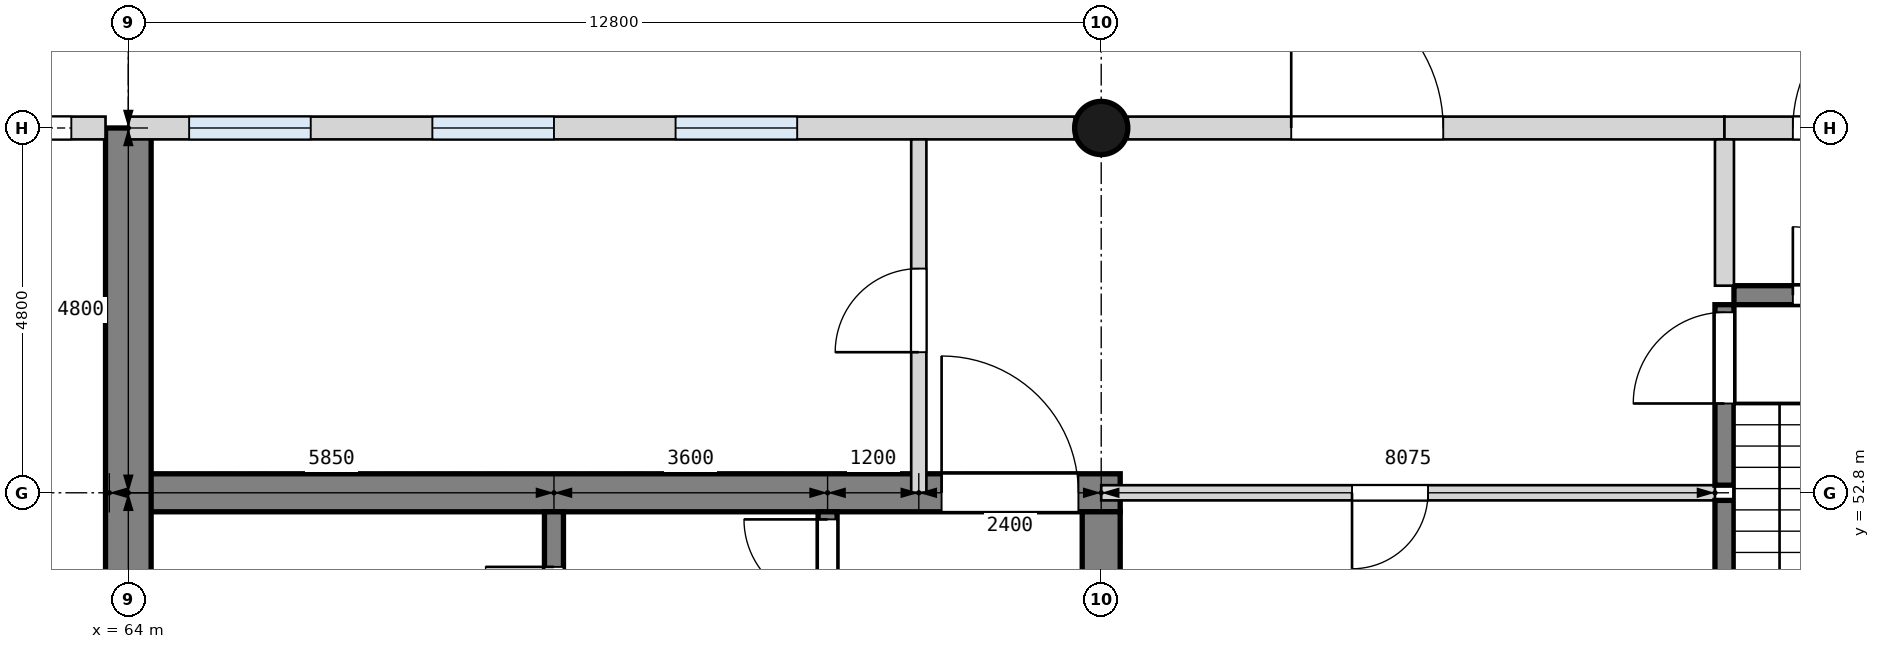
"""IFC4 building model, lengths in metres.
Left out: names, types, materials, properties, quantities, classifications, styles, units other than length and angle.
Written with IfcOpenShell. Run it as: python <this file> out.ifc"""

import sys

from ifc_helpers import new_model, si_unit, direction, frame, frame_2d, origin, origin_2d, place, context, subcontext, project, spatial, rectangle, circle, extrude, element, fill, save


model = new_model("IFC4")
c1 = context("Model", 3, precision=1e-05, world=origin(), true_north=direction((0.0, 1.0)))
c2 = subcontext(c1, "Body", "Model", "MODEL_VIEW")
j1 = project(units=[si_unit("LENGTHUNIT", "METRE"), si_unit("PLANEANGLEUNIT", "RADIAN")], contexts=[c1])
p1 = place(None, origin())
s1 = spatial("IfcSite", under=j1, at=p1, CompositionType="ELEMENT")
p2 = place(p1, origin())
s2 = spatial("IfcBuilding", under=s1, at=p2, CompositionType="ELEMENT")
p3 = place(p2, origin())
s3 = spatial("IfcBuildingStorey", under=s2, at=p3, CompositionType="ELEMENT", Elevation=0.0)
p4 = place(p3, frame((63.75, 52.8, 0.0), z_axis=(0.0, 0.0, 1.0), x_axis=(1.0, 0.0, 0.0)))
e1 = element("IfcWall", 1, at=p4, inside=s3, PredefinedType="SHEAR", context=c2, shape_type="SweptSolid", body=[
    extrude(rectangle(XDim=13.3, YDim=0.5, at=frame_2d((6.65, 0.0))), origin(), (0.0, 0.0, 1.0), 4.2),
])
p5 = place(p4, frame((10.95, 0.0, 0.0)))
e2 = element("IfcOpeningElement", 2, at=p5, cuts=e1, PredefinedType="OPENING", context=c2, shape_type="SweptSolid", body=[
    extrude(rectangle(XDim=1.8, YDim=2.1, at=frame_2d((0.9, 1.05))), frame((0.0, 0.26, 0.0), z_axis=(0.0, -1.0, 0.0), x_axis=(1.0, 0.0, 0.0)), (0.0, 0.0, 1.0), 0.52),
])
p6 = place(p3, frame((76.8, 33.85, 0.0), z_axis=(0.0, 0.0, 1.0), x_axis=(0.0, 1.0, 0.0)))
e3 = element("IfcWall", 3, at=p6, inside=s3, PredefinedType="SHEAR", context=c2, shape_type="SweptSolid", body=[
    extrude(rectangle(XDim=18.7, YDim=0.5, at=frame_2d((9.35, 0.0))), origin(), (0.0, 0.0, 1.0), 4.2),
])
p7 = place(p3, frame((64.0, 28.8, 0.0), z_axis=(0.0, 0.0, 1.0), x_axis=(0.0, 1.0, 0.0)))
e4 = element("IfcWall", 4, at=p7, inside=s3, PredefinedType="SHEAR", context=c2, shape_type="SweptSolid", body=[
    extrude(rectangle(XDim=28.8, YDim=0.6, at=frame_2d((14.4, 0.0))), origin(), (0.0, 0.0, 1.0), 4.2),
])
p8 = place(p7, frame((0.5, 0.0, 0.0)))
e5 = element("IfcOpeningElement", 5, at=p8, cuts=e4, PredefinedType="OPENING", context=c2, shape_type="SweptSolid", body=[
    extrude(rectangle(XDim=1.2, YDim=2.1, at=frame_2d((0.6, 1.05))), frame((0.0, 0.31, 0.0), z_axis=(0.0, -1.0, 0.0), x_axis=(1.0, 0.0, 0.0)), (0.0, 0.0, 1.0), 0.62),
])
p9 = place(p7, frame((3.1, 0.0, 0.0)))
e6 = element("IfcOpeningElement", 6, at=p9, cuts=e4, PredefinedType="OPENING", context=c2, shape_type="SweptSolid", body=[
    extrude(rectangle(XDim=1.2, YDim=2.1, at=frame_2d((0.6, 1.05))), frame((0.0, 0.31, 0.0), z_axis=(0.0, -1.0, 0.0), x_axis=(1.0, 0.0, 0.0)), (0.0, 0.0, 1.0), 0.62),
])
p10 = place(p3, frame((76.8, 57.6, 0.0), z_axis=(0.0, 0.0, 1.0), x_axis=(1.0, 0.0, 0.0)))
e7 = element("IfcColumn", 7, at=p10, inside=s3, PredefinedType="COLUMN", context=c2, shape_type="SweptSolid", body=[
    extrude(circle(Radius=0.35, at=origin_2d()), origin(), (0.0, 0.0, 1.0), 4.2),
])
p11 = place(p3, frame((64.0, 57.6, 0.0), z_axis=(0.0, 0.0, 1.0), x_axis=(1.0, 0.0, 0.0)))
e8 = element("IfcWall", 8, at=p11, inside=s3, PredefinedType="SOLIDWALL", context=c2, shape_type="SweptSolid", body=[
    extrude(rectangle(XDim=12.45, YDim=0.3, at=frame_2d((6.225, 0.0))), origin(), (0.0, 0.0, 1.0), 3.0),
])
p12 = place(p11, frame((0.8, 0.0, 0.3)))
e9 = element("IfcOpeningElement", 9, at=p12, cuts=e8, PredefinedType="OPENING", context=c2, shape_type="SweptSolid", body=[
    extrude(rectangle(XDim=1.6, YDim=2.4, at=frame_2d((0.8, 1.2))), frame((0.0, 0.16, 0.0), z_axis=(0.0, -1.0, 0.0), x_axis=(1.0, 0.0, 0.0)), (0.0, 0.0, 1.0), 0.32),
])
p13 = place(p11, frame((4.0, 0.0, 0.3)))
e10 = element("IfcOpeningElement", 10, at=p13, cuts=e8, PredefinedType="OPENING", context=c2, shape_type="SweptSolid", body=[
    extrude(rectangle(XDim=1.6, YDim=2.4, at=frame_2d((0.8, 1.2))), frame((0.0, 0.16, 0.0), z_axis=(0.0, -1.0, 0.0), x_axis=(1.0, 0.0, 0.0)), (0.0, 0.0, 1.0), 0.32),
])
p14 = place(p11, frame((7.2, 0.0, 0.3)))
e11 = element("IfcOpeningElement", 11, at=p14, cuts=e8, PredefinedType="OPENING", context=c2, shape_type="SweptSolid", body=[
    extrude(rectangle(XDim=1.6, YDim=2.4, at=frame_2d((0.8, 1.2))), frame((0.0, 0.16, 0.0), z_axis=(0.0, -1.0, 0.0), x_axis=(1.0, 0.0, 0.0)), (0.0, 0.0, 1.0), 0.32),
])
p15 = place(p3, frame((77.15, 57.6, 0.0), z_axis=(0.0, 0.0, 1.0), x_axis=(1.0, 0.0, 0.0)))
e12 = element("IfcWall", 12, at=p15, inside=s3, PredefinedType="SOLIDWALL", context=c2, shape_type="SweptSolid", body=[
    extrude(rectangle(XDim=7.85, YDim=0.3, at=frame_2d((3.925, 0.0))), origin(), (0.0, 0.0, 1.0), 3.0),
])
p16 = place(p15, frame((2.15, 0.0, 0.0)))
e13 = element("IfcOpeningElement", 13, at=p16, cuts=e12, PredefinedType="OPENING", context=c2, shape_type="SweptSolid", body=[
    extrude(rectangle(XDim=2.0, YDim=2.1, at=frame_2d((1.0, 1.05))), frame((0.0, 0.16, 0.0), z_axis=(0.0, -1.0, 0.0), x_axis=(1.0, 0.0, 0.0)), (0.0, 0.0, 1.0), 0.32),
])
p17 = place(p3, frame((85.0, 57.6, 0.0), z_axis=(0.0, 0.0, 1.0), x_axis=(1.0, 0.0, 0.0)))
e14 = element("IfcWall", 14, at=p17, inside=s3, PredefinedType="SOLIDWALL", context=c2, shape_type="SweptSolid", body=[
    extrude(rectangle(XDim=4.25, YDim=0.3, at=frame_2d((2.125, 0.0))), origin(), (0.0, 0.0, 1.0), 3.0),
])
p18 = place(p17, frame((0.9, 0.0, 0.0)))
e15 = element("IfcOpeningElement", 15, at=p18, cuts=e14, PredefinedType="OPENING", context=c2, shape_type="SweptSolid", body=[
    extrude(rectangle(XDim=1.8, YDim=2.1, at=frame_2d((0.9, 1.05))), frame((0.0, 0.16, 0.0), z_axis=(0.0, -1.0, 0.0), x_axis=(1.0, 0.0, 0.0)), (0.0, 0.0, 1.0), 0.32),
])
p19 = place(p3, frame((58.4, 57.6, 0.0), z_axis=(0.0, 0.0, 1.0), x_axis=(1.0, 0.0, 0.0)))
e16 = element("IfcWall", 16, at=p19, inside=s3, PredefinedType="SOLIDWALL", context=c2, shape_type="SweptSolid", body=[
    extrude(rectangle(XDim=5.3, YDim=0.3, at=frame_2d((2.65, 0.0))), origin(), (0.0, 0.0, 1.0), 5.1),
])
p20 = place(p19, frame((0.45, 0.0, 0.0)))
e17 = element("IfcOpeningElement", 17, at=p20, cuts=e16, PredefinedType="OPENING", context=c2, shape_type="SweptSolid", body=[
    extrude(rectangle(XDim=4.4, YDim=4.5, at=frame_2d((2.2, 2.25))), frame((0.0, 0.16, 0.0), z_axis=(0.0, -1.0, 0.0), x_axis=(1.0, 0.0, 0.0)), (0.0, 0.0, 1.0), 0.32),
])
p21 = place(p3, frame((73.2, 46.475, 0.0), z_axis=(0.0, 0.0, 1.0), x_axis=(0.0, 1.0, 0.0)))
e18 = element("IfcWall", 18, at=p21, inside=s3, PredefinedType="SOLIDWALL", context=c2, shape_type="SweptSolid", body=[
    extrude(rectangle(XDim=6.075, YDim=0.25, at=frame_2d((3.038, 0.0))), origin(), (0.0, 0.0, 1.0), 3.9),
])
p22 = place(p21, frame((4.875, 0.0, 0.0)))
e19 = element("IfcOpeningElement", 19, at=p22, cuts=e18, PredefinedType="OPENING", context=c2, shape_type="SweptSolid", body=[
    extrude(rectangle(XDim=1.1, YDim=2.1, at=frame_2d((0.55, 1.05))), frame((0.0, 0.135, 0.0), z_axis=(0.0, -1.0, 0.0), x_axis=(1.0, 0.0, 0.0)), (0.0, 0.0, 1.0), 0.27),
])
p23 = place(p3, frame((69.6, 46.475, 0.0), z_axis=(0.0, 0.0, 1.0), x_axis=(0.0, 1.0, 0.0)))
e20 = element("IfcWall", 20, at=p23, inside=s3, PredefinedType="SOLIDWALL", context=c2, shape_type="SweptSolid", body=[
    extrude(rectangle(XDim=6.075, YDim=0.25, at=frame_2d((3.038, 0.0))), origin(), (0.0, 0.0, 1.0), 3.9),
])
p24 = place(p23, frame((1.312, 0.0, 0.0)))
e21 = element("IfcOpeningElement", 21, at=p24, cuts=e20, PredefinedType="OPENING", context=c2, shape_type="SweptSolid", body=[
    extrude(rectangle(XDim=1.0, YDim=2.1, at=frame_2d((0.5, 1.05))), frame((0.0, 0.135, 0.0), z_axis=(0.0, -1.0, 0.0), x_axis=(1.0, 0.0, 0.0)), (0.0, 0.0, 1.0), 0.27),
])
p25 = place(p23, frame((4.45, 0.0, 0.0)))
e22 = element("IfcOpeningElement", 22, at=p25, cuts=e20, PredefinedType="OPENING", context=c2, shape_type="SweptSolid", body=[
    extrude(rectangle(XDim=0.9, YDim=2.1, at=frame_2d((0.45, 1.05))), frame((0.0, 0.135, 0.0), z_axis=(0.0, -1.0, 0.0), x_axis=(1.0, 0.0, 0.0)), (0.0, 0.0, 1.0), 0.27),
])
p26 = place(p3, frame((84.875, 52.8, 0.0), z_axis=(0.0, 0.0, 1.0), x_axis=(-1.0, 0.0, 0.0)))
e23 = element("IfcWall", 23, at=p26, inside=s3, PredefinedType="PARTITIONING", context=c2, shape_type="SweptSolid", body=[
    extrude(rectangle(XDim=8.075, YDim=0.2, at=frame_2d((4.038, 0.0))), origin(), (0.0, 0.0, 1.0), 3.9),
])
p27 = place(p26, frame((3.775, 0.0, 0.0)))
e24 = element("IfcOpeningElement", 24, at=p27, cuts=e23, PredefinedType="OPENING", context=c2, shape_type="SweptSolid", body=[
    extrude(rectangle(XDim=1.0, YDim=2.1, at=frame_2d((0.5, 1.05))), frame((0.0, 0.11, 0.0), z_axis=(0.0, -1.0, 0.0), x_axis=(1.0, 0.0, 0.0)), (0.0, 0.0, 1.0), 0.22),
])
p28 = place(p3, frame((88.475, 55.4, 0.0), z_axis=(0.0, 0.0, 1.0), x_axis=(-1.0, 0.0, 0.0)))
e25 = element("IfcWall", 25, at=p28, inside=s3, PredefinedType="SHEAR", context=c2, shape_type="SweptSolid", body=[
    extrude(rectangle(XDim=3.35, YDim=0.25, at=frame_2d((1.675, 0.0))), origin(), (0.0, 0.0, 1.0), 3.9),
])
p29 = place(p28, frame((0.775, 0.0, 0.0)))
e26 = element("IfcOpeningElement", 26, at=p29, cuts=e25, PredefinedType="OPENING", context=c2, shape_type="SweptSolid", body=[
    extrude(rectangle(XDim=1.8, YDim=2.1, at=frame_2d((0.9, 1.05))), frame((0.0, 0.135, 0.0), z_axis=(0.0, -1.0, 0.0), x_axis=(1.0, 0.0, 0.0)), (0.0, 0.0, 1.0), 0.27),
])
p30 = place(p3, frame((85.0, 49.525, 0.0), z_axis=(0.0, 0.0, 1.0), x_axis=(0.0, 1.0, 0.0)))
e27 = element("IfcWall", 27, at=p30, inside=s3, PredefinedType="SHEAR", context=c2, shape_type="SweptSolid", body=[
    extrude(rectangle(XDim=3.175, YDim=0.25, at=frame_2d((1.587, 0.0))), origin(), (0.0, 0.0, 1.0), 3.9),
])
p31 = place(p3, frame((85.0, 52.9, 0.0), z_axis=(0.0, 0.0, 1.0), x_axis=(0.0, 1.0, 0.0)))
e28 = element("IfcWall", 28, at=p31, inside=s3, PredefinedType="SHEAR", context=c2, shape_type="SweptSolid", body=[
    extrude(rectangle(XDim=2.375, YDim=0.25, at=frame_2d((1.188, 0.0))), origin(), (0.0, 0.0, 1.0), 3.9),
])
p32 = place(p31, frame((1.075, 0.0, 0.0)))
e29 = element("IfcOpeningElement", 29, at=p32, cuts=e28, PredefinedType="OPENING", context=c2, shape_type="SweptSolid", body=[
    extrude(rectangle(XDim=1.2, YDim=2.1, at=frame_2d((0.6, 1.05))), frame((0.0, 0.135, 0.0), z_axis=(0.0, -1.0, 0.0), x_axis=(1.0, 0.0, 0.0)), (0.0, 0.0, 1.0), 0.27),
])
p33 = place(p3, frame((85.0, 55.525, 0.0), z_axis=(0.0, 0.0, 1.0), x_axis=(0.0, 1.0, 0.0)))
e30 = element("IfcWall", 30, at=p33, inside=s3, PredefinedType="PARTITIONING", context=c2, shape_type="SweptSolid", body=[
    extrude(rectangle(XDim=1.925, YDim=0.25, at=frame_2d((0.962, 0.0))), origin(), (0.0, 0.0, 1.0), 3.9),
])
p34 = place(p3, frame((74.4, 52.8, 0.0), z_axis=(0.0, 0.0, 1.0), x_axis=(0.0, 1.0, 0.0)))
e31 = element("IfcWall", 31, at=p34, inside=s3, PredefinedType="PARTITIONING", context=c2, shape_type="SweptSolid", body=[
    extrude(rectangle(XDim=4.65, YDim=0.2, at=frame_2d((2.325, 0.0))), origin(), (0.0, 0.0, 1.0), 3.9),
])
p35 = place(p34, frame((1.85, 0.0, 0.0)))
e32 = element("IfcOpeningElement", 32, at=p35, cuts=e31, PredefinedType="OPENING", context=c2, shape_type="SweptSolid", body=[
    extrude(rectangle(XDim=1.1, YDim=2.1, at=frame_2d((0.55, 1.05))), frame((0.0, 0.11, 0.0), z_axis=(0.0, -1.0, 0.0), x_axis=(1.0, 0.0, 0.0)), (0.0, 0.0, 1.0), 0.22),
])
p36 = place(p16, origin())
e33 = element("IfcDoor", 33, at=p36, inside=s3, OperationType="SINGLE_SWING_LEFT", PredefinedType="DOOR", context=c2, shape_type="SweptSolid", body=[
    extrude(rectangle(XDim=2.0, YDim=2.1, at=frame_2d((1.0, 1.05))), frame((0.0, 0.025, 0.0), z_axis=(0.0, -1.0, 0.0), x_axis=(1.0, 0.0, 0.0)), (0.0, 0.0, 1.0), 0.05),
])
fill(e13, e33)
p37 = place(p18, origin())
e34 = element("IfcDoor", 34, at=p37, inside=s3, OperationType="SINGLE_SWING_RIGHT", PredefinedType="DOOR", context=c2, shape_type="SweptSolid", body=[
    extrude(rectangle(XDim=1.8, YDim=2.1, at=frame_2d((0.9, 1.05))), frame((0.0, 0.025, 0.0), z_axis=(0.0, -1.0, 0.0), x_axis=(1.0, 0.0, 0.0)), (0.0, 0.0, 1.0), 0.05),
])
fill(e15, e34)
p38 = place(p20, origin())
e35 = element("IfcDoor", 35, at=p38, inside=s3, OperationType="ROLLINGUP", PredefinedType="DOOR", context=c2, shape_type="SweptSolid", body=[
    extrude(rectangle(XDim=4.4, YDim=4.5, at=frame_2d((2.2, 2.25))), frame((0.0, 0.025, 0.0), z_axis=(0.0, -1.0, 0.0), x_axis=(1.0, 0.0, 0.0)), (0.0, 0.0, 1.0), 0.05),
])
fill(e17, e35)
p39 = place(p22, origin())
e36 = element("IfcDoor", 36, at=p39, inside=s3, OperationType="SINGLE_SWING_RIGHT", PredefinedType="DOOR", context=c2, shape_type="SweptSolid", body=[
    extrude(rectangle(XDim=1.1, YDim=2.1, at=frame_2d((0.55, 1.05))), frame((0.0, 0.025, 0.0), z_axis=(0.0, -1.0, 0.0), x_axis=(1.0, 0.0, 0.0)), (0.0, 0.0, 1.0), 0.05),
])
fill(e19, e36)
p40 = place(p25, origin())
e37 = element("IfcDoor", 37, at=p40, inside=s3, OperationType="SINGLE_SWING_RIGHT", PredefinedType="DOOR", context=c2, shape_type="SweptSolid", body=[
    extrude(rectangle(XDim=0.9, YDim=2.1, at=frame_2d((0.45, 1.05))), frame((0.0, 0.025, 0.0), z_axis=(0.0, -1.0, 0.0), x_axis=(1.0, 0.0, 0.0)), (0.0, 0.0, 1.0), 0.05),
])
fill(e22, e37)
p41 = place(p5, origin())
e38 = element("IfcDoor", 38, at=p41, inside=s3, OperationType="SINGLE_SWING_LEFT", PredefinedType="DOOR", context=c2, shape_type="SweptSolid", body=[
    extrude(rectangle(XDim=1.8, YDim=2.1, at=frame_2d((0.9, 1.05))), frame((0.0, 0.025, 0.0), z_axis=(0.0, -1.0, 0.0), x_axis=(1.0, 0.0, 0.0)), (0.0, 0.0, 1.0), 0.05),
])
fill(e2, e38)
p42 = place(p27, origin())
e39 = element("IfcDoor", 39, at=p42, inside=s3, OperationType="SINGLE_SWING_RIGHT", PredefinedType="DOOR", context=c2, shape_type="SweptSolid", body=[
    extrude(rectangle(XDim=1.0, YDim=2.1, at=frame_2d((0.5, 1.05))), frame((0.0, 0.025, 0.0), z_axis=(0.0, -1.0, 0.0), x_axis=(1.0, 0.0, 0.0)), (0.0, 0.0, 1.0), 0.05),
])
fill(e24, e39)
p43 = place(p32, origin())
e40 = element("IfcDoor", 40, at=p43, inside=s3, OperationType="SINGLE_SWING_LEFT", PredefinedType="DOOR", context=c2, shape_type="SweptSolid", body=[
    extrude(rectangle(XDim=1.2, YDim=2.1, at=frame_2d((0.6, 1.05))), frame((0.0, 0.025, 0.0), z_axis=(0.0, -1.0, 0.0), x_axis=(1.0, 0.0, 0.0)), (0.0, 0.0, 1.0), 0.05),
])
fill(e29, e40)
p44 = place(p29, frame((1.8, 0.0, 0.0), z_axis=(0.0, 0.0, 1.0), x_axis=(-1.0, 0.0, 0.0)))
e41 = element("IfcDoor", 41, at=p44, inside=s3, OperationType="DOUBLE_DOOR_SINGLE_SWING", PredefinedType="DOOR", context=c2, shape_type="SweptSolid", body=[
    extrude(rectangle(XDim=1.8, YDim=2.1, at=frame_2d((0.9, 1.05))), frame((0.0, 0.025, 0.0), z_axis=(0.0, -1.0, 0.0), x_axis=(1.0, 0.0, 0.0)), (0.0, 0.0, 1.0), 0.05),
])
fill(e26, e41)
p45 = place(p35, origin())
e42 = element("IfcDoor", 42, at=p45, inside=s3, OperationType="SINGLE_SWING_LEFT", PredefinedType="DOOR", context=c2, shape_type="SweptSolid", body=[
    extrude(rectangle(XDim=1.1, YDim=2.1, at=frame_2d((0.55, 1.05))), frame((0.0, 0.025, 0.0), z_axis=(0.0, -1.0, 0.0), x_axis=(1.0, 0.0, 0.0)), (0.0, 0.0, 1.0), 0.05),
])
fill(e32, e42)
p46 = place(p12, origin())
e43 = element("IfcWindow", 43, at=p46, inside=s3, PartitioningType="SINGLE_PANEL", PredefinedType="WINDOW", context=c2, shape_type="SweptSolid", body=[
    extrude(rectangle(XDim=1.6, YDim=2.4, at=frame_2d((0.8, 1.2))), frame((0.0, 0.03, 0.0), z_axis=(0.0, -1.0, 0.0), x_axis=(1.0, 0.0, 0.0)), (0.0, 0.0, 1.0), 0.06),
])
fill(e9, e43)
p47 = place(p13, origin())
e44 = element("IfcWindow", 44, at=p47, inside=s3, PartitioningType="SINGLE_PANEL", PredefinedType="WINDOW", context=c2, shape_type="SweptSolid", body=[
    extrude(rectangle(XDim=1.6, YDim=2.4, at=frame_2d((0.8, 1.2))), frame((0.0, 0.03, 0.0), z_axis=(0.0, -1.0, 0.0), x_axis=(1.0, 0.0, 0.0)), (0.0, 0.0, 1.0), 0.06),
])
fill(e10, e44)
p48 = place(p14, origin())
e45 = element("IfcWindow", 45, at=p48, inside=s3, PartitioningType="SINGLE_PANEL", PredefinedType="WINDOW", context=c2, shape_type="SweptSolid", body=[
    extrude(rectangle(XDim=1.6, YDim=2.4, at=frame_2d((0.8, 1.2))), frame((0.0, 0.03, 0.0), z_axis=(0.0, -1.0, 0.0), x_axis=(1.0, 0.0, 0.0)), (0.0, 0.0, 1.0), 0.06),
])
fill(e11, e45)
save(model, sys.argv[1])
